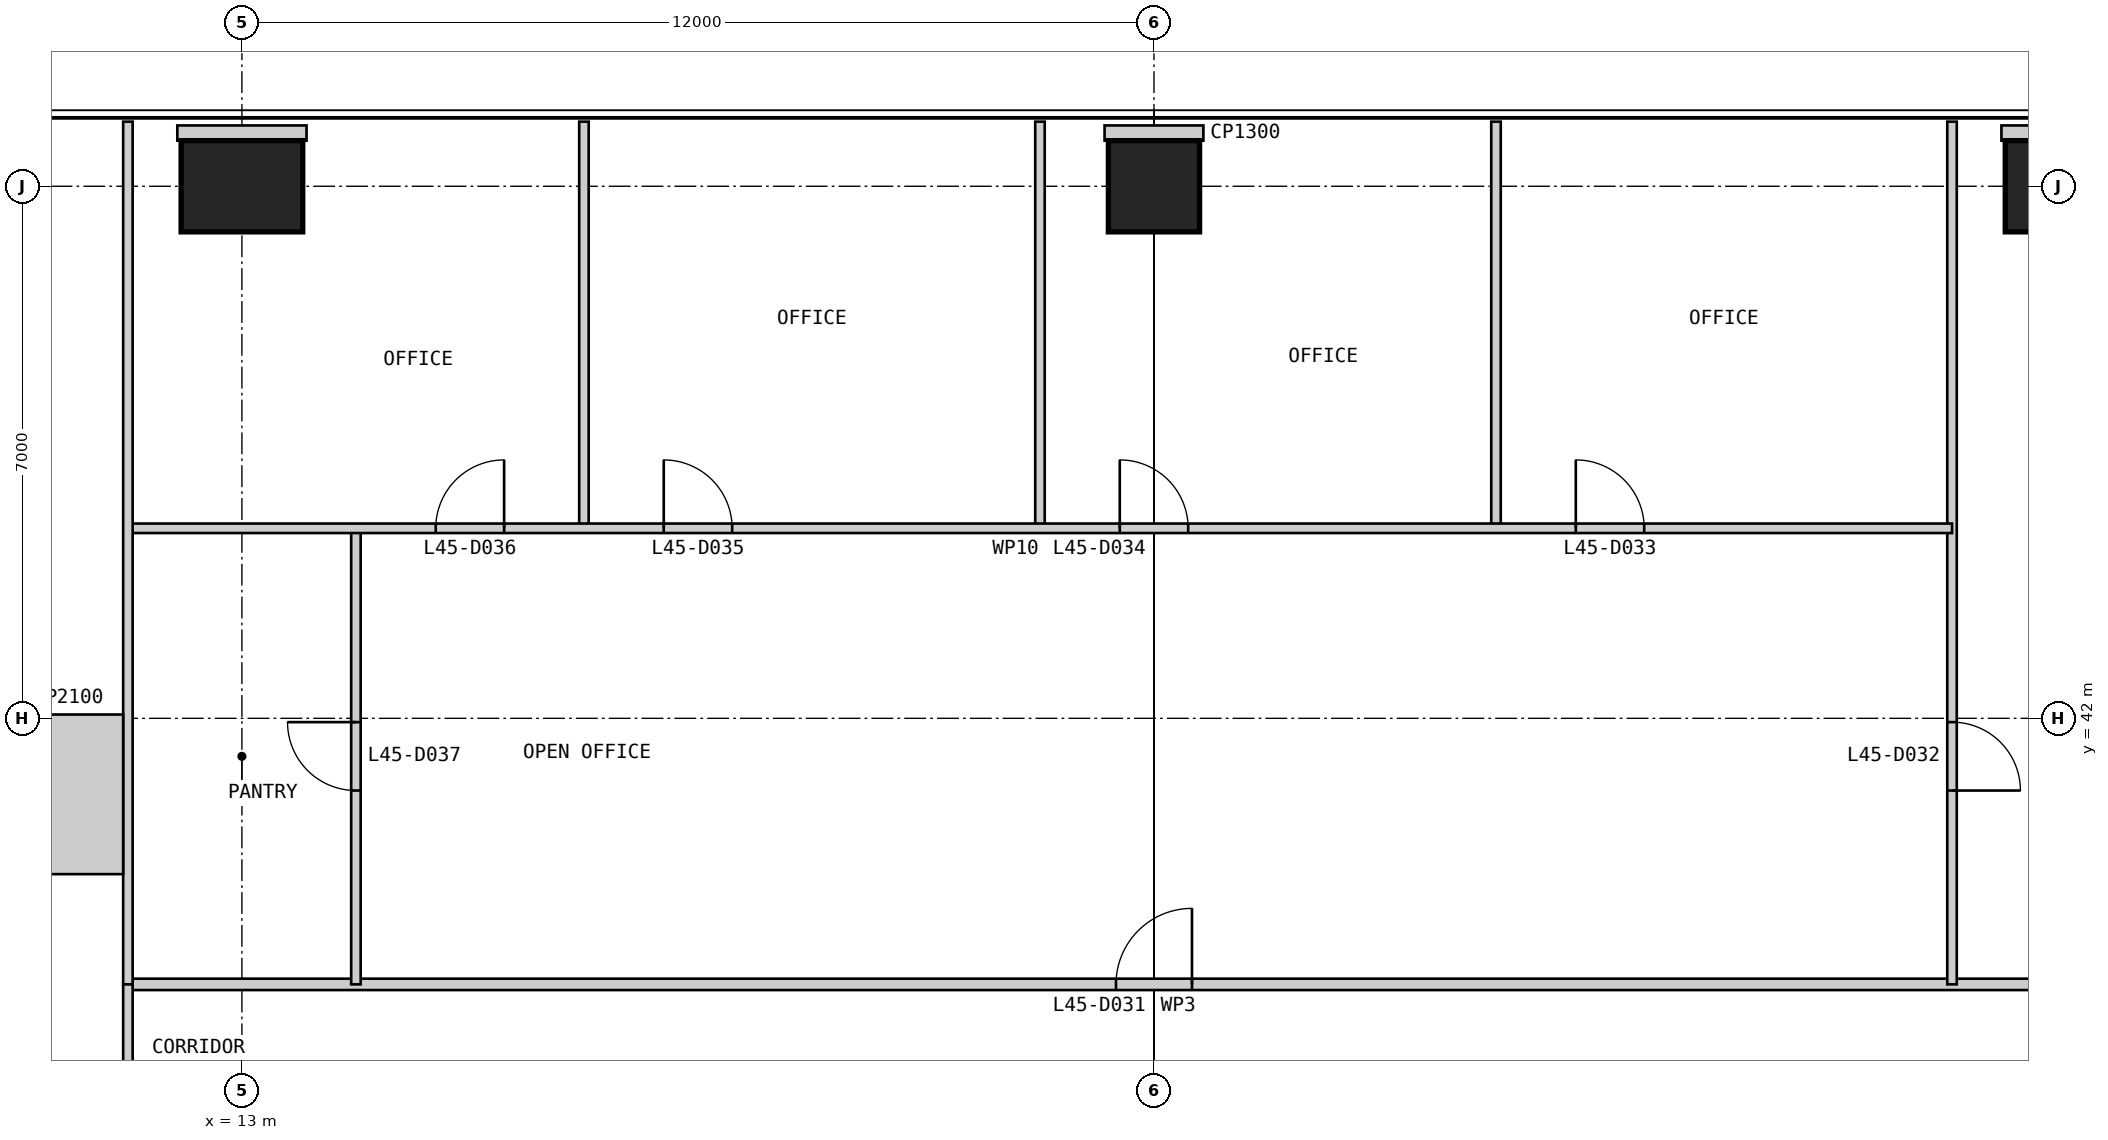
"""IFC4 building model, lengths in metres.
Left out: names, types, materials, properties, quantities, classifications, styles, units other than length and angle.
Written with IfcOpenShell. Run it as: python <this file> out.ifc"""

import sys

from ifc_helpers import new_model, si_unit, direction, frame, frame_2d, origin, origin_2d, place, context, subcontext, project, spatial, rectangle, extrude, element, fill, save


model = new_model("IFC4")
c1 = context("Model", 3, precision=1e-05, world=origin(), true_north=direction((0.0, 1.0)))
c2 = subcontext(c1, "Body", "Model", "MODEL_VIEW")
j1 = project(units=[si_unit("LENGTHUNIT", "METRE"), si_unit("PLANEANGLEUNIT", "RADIAN")], contexts=[c1])
p1 = place(None, origin())
s1 = spatial("IfcSite", under=j1, at=p1, CompositionType="ELEMENT")
p2 = place(p1, origin())
s2 = spatial("IfcBuilding", under=s1, at=p2, CompositionType="ELEMENT")
p3 = place(p2, frame((0.0, 0.0, 193.8)))
s3 = spatial("IfcBuildingStorey", under=s2, at=p3, CompositionType="ELEMENT", Elevation=193.8)
p4 = place(p3, frame((37.0, 49.0, 0.0), z_axis=(0.0, 0.0, 1.0), x_axis=(1.0, 0.0, 0.0)))
e1 = element("IfcColumn", 1, at=p4, inside=s3, PredefinedType="COLUMN", context=c2, shape_type="SweptSolid", body=[
    extrude(rectangle(XDim=1.6, YDim=1.2, at=origin_2d()), origin(), (0.0, 0.0, 1.0), 4.0),
])
p5 = place(p3, frame((25.0, 49.0, 0.0), z_axis=(0.0, 0.0, 1.0), x_axis=(1.0, 0.0, 0.0)))
e2 = element("IfcColumn", 2, at=p5, inside=s3, PredefinedType="COLUMN", context=c2, shape_type="SweptSolid", body=[
    extrude(rectangle(XDim=1.2, YDim=1.2, at=origin_2d()), origin(), (0.0, 0.0, 1.0), 4.0),
])
p6 = place(p3, frame((13.0, 49.0, 0.0), z_axis=(0.0, 0.0, 1.0), x_axis=(1.0, 0.0, 0.0)))
e3 = element("IfcColumn", 3, at=p6, inside=s3, PredefinedType="COLUMN", context=c2, shape_type="SweptSolid", body=[
    extrude(rectangle(XDim=1.6, YDim=1.2, at=origin_2d()), origin(), (0.0, 0.0, 1.0), 4.0),
])
p7 = place(p3, frame((38.5, 38.5, 0.0), z_axis=(0.0, 0.0, 1.0), x_axis=(-1.0, 0.0, 0.0)))
e4 = element("IfcWall", 4, at=p7, inside=s3, PredefinedType="PARTITIONING", context=c2, shape_type="SweptSolid", body=[
    extrude(rectangle(XDim=27.0, YDim=0.15, at=frame_2d((13.5, 0.0))), origin(), (0.0, 0.0, 1.0), 3.85),
])
p8 = place(p7, frame((13.0, 0.0, 0.0)))
e5 = element("IfcOpeningElement", 5, at=p8, cuts=e4, PredefinedType="OPENING", context=c2, shape_type="SweptSolid", body=[
    extrude(rectangle(XDim=1.0, YDim=2.2, at=frame_2d((0.5, 1.1))), frame((0.0, 0.085, 0.0), z_axis=(0.0, -1.0, 0.0), x_axis=(1.0, 0.0, 0.0)), (0.0, 0.0, 1.0), 0.17),
])
p9 = place(p3, frame((35.5, 49.85, 0.0), z_axis=(0.0, 0.0, 1.0), x_axis=(0.0, -1.0, 0.0)))
e6 = element("IfcWall", 6, at=p9, inside=s3, PredefinedType="PARTITIONING", context=c2, shape_type="SweptSolid", body=[
    extrude(rectangle(XDim=11.35, YDim=0.125, at=frame_2d((5.675, 0.0))), origin(), (0.0, 0.0, 1.0), 3.85),
])
p10 = place(p9, frame((7.9, 0.0, 0.0)))
e7 = element("IfcOpeningElement", 7, at=p10, cuts=e6, PredefinedType="OPENING", context=c2, shape_type="SweptSolid", body=[
    extrude(rectangle(XDim=0.9, YDim=2.2, at=frame_2d((0.45, 1.1))), frame((0.0, 0.073, 0.0), z_axis=(0.0, -1.0, 0.0), x_axis=(1.0, 0.0, 0.0)), (0.0, 0.0, 1.0), 0.145),
])
for number, where, z_axis, x_axis in (
    (8, (29.5, 49.85, 0.0), (0.0, 0.0, 1.0), (0.0, -1.0, 0.0)),
    (9, (23.5, 49.85, 0.0), (0.0, 0.0, 1.0), (0.0, -1.0, 0.0)),
    (10, (17.5, 49.85, 0.0), (0.0, 0.0, 1.0), (0.0, -1.0, 0.0)),
):
    element("IfcWall", number, at=place(p3, frame(where, z_axis=z_axis, x_axis=x_axis)), inside=s3, PredefinedType="PARTITIONING", context=c2, shape_type="SweptSolid", body=[
        extrude(rectangle(XDim=5.35, YDim=0.125, at=frame_2d((2.675, 0.0))), origin(), (0.0, 0.0, 1.0), 3.85),
    ])
p11 = place(p3, frame((14.5, 44.5, 0.0), z_axis=(0.0, 0.0, 1.0), x_axis=(0.0, -1.0, 0.0)))
e11 = element("IfcWall", 11, at=p11, inside=s3, PredefinedType="PARTITIONING", context=c2, shape_type="SweptSolid", body=[
    extrude(rectangle(XDim=6.0, YDim=0.125, at=frame_2d((3.0, 0.0))), origin(), (0.0, 0.0, 1.0), 3.85),
])
p12 = place(p11, frame((2.55, 0.0, 0.0)))
e12 = element("IfcOpeningElement", 12, at=p12, cuts=e11, PredefinedType="OPENING", context=c2, shape_type="SweptSolid", body=[
    extrude(rectangle(XDim=0.9, YDim=2.2, at=frame_2d((0.45, 1.1))), frame((0.0, 0.073, 0.0), z_axis=(0.0, -1.0, 0.0), x_axis=(1.0, 0.0, 0.0)), (0.0, 0.0, 1.0), 0.145),
])
p13 = place(p3, frame((35.5, 44.5, 0.0), z_axis=(0.0, 0.0, 1.0), x_axis=(-1.0, 0.0, 0.0)))
e13 = element("IfcWall", 13, at=p13, inside=s3, PredefinedType="PARTITIONING", context=c2, shape_type="SweptSolid", body=[
    extrude(rectangle(XDim=24.0, YDim=0.125, at=frame_2d((12.0, 0.0))), origin(), (0.0, 0.0, 1.0), 3.85),
])
p14 = place(p13, frame((4.05, 0.0, 0.0)))
e14 = element("IfcOpeningElement", 14, at=p14, cuts=e13, PredefinedType="OPENING", context=c2, shape_type="SweptSolid", body=[
    extrude(rectangle(XDim=0.9, YDim=2.2, at=frame_2d((0.45, 1.1))), frame((0.0, 0.073, 0.0), z_axis=(0.0, -1.0, 0.0), x_axis=(1.0, 0.0, 0.0)), (0.0, 0.0, 1.0), 0.145),
])
p15 = place(p13, frame((10.05, 0.0, 0.0)))
e15 = element("IfcOpeningElement", 15, at=p15, cuts=e13, PredefinedType="OPENING", context=c2, shape_type="SweptSolid", body=[
    extrude(rectangle(XDim=0.9, YDim=2.2, at=frame_2d((0.45, 1.1))), frame((0.0, 0.073, 0.0), z_axis=(0.0, -1.0, 0.0), x_axis=(1.0, 0.0, 0.0)), (0.0, 0.0, 1.0), 0.145),
])
p16 = place(p13, frame((16.05, 0.0, 0.0)))
e16 = element("IfcOpeningElement", 16, at=p16, cuts=e13, PredefinedType="OPENING", context=c2, shape_type="SweptSolid", body=[
    extrude(rectangle(XDim=0.9, YDim=2.2, at=frame_2d((0.45, 1.1))), frame((0.0, 0.073, 0.0), z_axis=(0.0, -1.0, 0.0), x_axis=(1.0, 0.0, 0.0)), (0.0, 0.0, 1.0), 0.145),
])
p17 = place(p13, frame((19.05, 0.0, 0.0)))
e17 = element("IfcOpeningElement", 17, at=p17, cuts=e13, PredefinedType="OPENING", context=c2, shape_type="SweptSolid", body=[
    extrude(rectangle(XDim=0.9, YDim=2.2, at=frame_2d((0.45, 1.1))), frame((0.0, 0.073, 0.0), z_axis=(0.0, -1.0, 0.0), x_axis=(1.0, 0.0, 0.0)), (0.0, 0.0, 1.0), 0.145),
])
p18 = place(p3, frame((11.5, 49.85, 0.0), z_axis=(0.0, 0.0, 1.0), x_axis=(0.0, -1.0, 0.0)))
e18 = element("IfcWall", 18, at=p18, inside=s3, PredefinedType="PARTITIONING", context=c2, shape_type="SweptSolid", body=[
    extrude(rectangle(XDim=11.35, YDim=0.125, at=frame_2d((5.675, 0.0))), origin(), (0.0, 0.0, 1.0), 3.85),
])
p19 = place(p3, frame((11.5, 38.5, 0.0), z_axis=(0.0, 0.0, 1.0), x_axis=(0.0, -1.0, 0.0)))
e19 = element("IfcWall", 19, at=p19, inside=s3, PredefinedType="PARTITIONING", context=c2, shape_type="SweptSolid", body=[
    extrude(rectangle(XDim=3.0, YDim=0.125, at=frame_2d((1.5, 0.0))), origin(), (0.0, 0.0, 1.0), 3.85),
])
p20 = place(p3, frame((37.0, 49.8, 0.0), z_axis=(0.0, 0.0, 1.0), x_axis=(0.0, -1.0, 0.0)))
e20 = element("IfcWall", 20, at=p20, inside=s3, PredefinedType="PARTITIONING", context=c2, shape_type="SweptSolid", body=[
    extrude(rectangle(XDim=0.2, YDim=1.7, at=frame_2d((0.1, 0.0))), origin(), (0.0, 0.0, 1.0), 3.85),
])
p21 = place(p3, frame((25.0, 49.8, 0.0), z_axis=(0.0, 0.0, 1.0), x_axis=(0.0, -1.0, 0.0)))
e21 = element("IfcWall", 21, at=p21, inside=s3, PredefinedType="PARTITIONING", context=c2, shape_type="SweptSolid", body=[
    extrude(rectangle(XDim=0.2, YDim=1.3, at=frame_2d((0.1, 0.0))), origin(), (0.0, 0.0, 1.0), 3.85),
])
p22 = place(p3, frame((13.0, 49.8, 0.0), z_axis=(0.0, 0.0, 1.0), x_axis=(0.0, -1.0, 0.0)))
e22 = element("IfcWall", 22, at=p22, inside=s3, PredefinedType="PARTITIONING", context=c2, shape_type="SweptSolid", body=[
    extrude(rectangle(XDim=0.2, YDim=1.7, at=frame_2d((0.1, 0.0))), origin(), (0.0, 0.0, 1.0), 3.85),
])
p23 = place(p3, frame((11.438, 41.0, 0.0), z_axis=(0.0, 0.0, 1.0), x_axis=(-1.0, 0.0, 0.0)))
e23 = element("IfcWall", 23, at=p23, inside=s3, PredefinedType="PARTITIONING", context=c2, shape_type="SweptSolid", body=[
    extrude(rectangle(XDim=1.438, YDim=2.1, at=frame_2d((0.719, 0.0))), origin(), (0.0, 0.0, 1.0), 3.85),
])
p24 = place(p8, frame((1.0, 0.0, 0.0), z_axis=(0.0, 0.0, 1.0), x_axis=(-1.0, 0.0, 0.0)))
e24 = element("IfcDoor", 24, at=p24, inside=s3, OperationType="SINGLE_SWING_RIGHT", PredefinedType="DOOR", context=c2, shape_type="SweptSolid", body=[
    extrude(rectangle(XDim=1.0, YDim=2.2, at=frame_2d((0.5, 1.1))), frame((0.0, 0.025, 0.0), z_axis=(0.0, -1.0, 0.0), x_axis=(1.0, 0.0, 0.0)), (0.0, 0.0, 1.0), 0.05),
])
fill(e5, e24)
p25 = place(p10, origin())
e25 = element("IfcDoor", 25, at=p25, inside=s3, OperationType="SINGLE_SWING_RIGHT", PredefinedType="DOOR", context=c2, shape_type="SweptSolid", body=[
    extrude(rectangle(XDim=0.9, YDim=2.2, at=frame_2d((0.45, 1.1))), frame((0.0, 0.025, 0.0), z_axis=(0.0, -1.0, 0.0), x_axis=(1.0, 0.0, 0.0)), (0.0, 0.0, 1.0), 0.05),
])
fill(e7, e25)
p26 = place(p14, frame((0.9, 0.0, 0.0), z_axis=(0.0, 0.0, 1.0), x_axis=(-1.0, 0.0, 0.0)))
e26 = element("IfcDoor", 26, at=p26, inside=s3, OperationType="SINGLE_SWING_LEFT", PredefinedType="DOOR", context=c2, shape_type="SweptSolid", body=[
    extrude(rectangle(XDim=0.9, YDim=2.2, at=frame_2d((0.45, 1.1))), frame((0.0, 0.025, 0.0), z_axis=(0.0, -1.0, 0.0), x_axis=(1.0, 0.0, 0.0)), (0.0, 0.0, 1.0), 0.05),
])
fill(e14, e26)
p27 = place(p15, frame((0.9, 0.0, 0.0), z_axis=(0.0, 0.0, 1.0), x_axis=(-1.0, 0.0, 0.0)))
e27 = element("IfcDoor", 27, at=p27, inside=s3, OperationType="SINGLE_SWING_LEFT", PredefinedType="DOOR", context=c2, shape_type="SweptSolid", body=[
    extrude(rectangle(XDim=0.9, YDim=2.2, at=frame_2d((0.45, 1.1))), frame((0.0, 0.025, 0.0), z_axis=(0.0, -1.0, 0.0), x_axis=(1.0, 0.0, 0.0)), (0.0, 0.0, 1.0), 0.05),
])
fill(e15, e27)
p28 = place(p16, frame((0.9, 0.0, 0.0), z_axis=(0.0, 0.0, 1.0), x_axis=(-1.0, 0.0, 0.0)))
e28 = element("IfcDoor", 28, at=p28, inside=s3, OperationType="SINGLE_SWING_LEFT", PredefinedType="DOOR", context=c2, shape_type="SweptSolid", body=[
    extrude(rectangle(XDim=0.9, YDim=2.2, at=frame_2d((0.45, 1.1))), frame((0.0, 0.025, 0.0), z_axis=(0.0, -1.0, 0.0), x_axis=(1.0, 0.0, 0.0)), (0.0, 0.0, 1.0), 0.05),
])
fill(e16, e28)
p29 = place(p17, frame((0.9, 0.0, 0.0), z_axis=(0.0, 0.0, 1.0), x_axis=(-1.0, 0.0, 0.0)))
e29 = element("IfcDoor", 29, at=p29, inside=s3, OperationType="SINGLE_SWING_RIGHT", PredefinedType="DOOR", context=c2, shape_type="SweptSolid", body=[
    extrude(rectangle(XDim=0.9, YDim=2.2, at=frame_2d((0.45, 1.1))), frame((0.0, 0.025, 0.0), z_axis=(0.0, -1.0, 0.0), x_axis=(1.0, 0.0, 0.0)), (0.0, 0.0, 1.0), 0.05),
])
fill(e17, e29)
p30 = place(p12, frame((0.9, 0.0, 0.0), z_axis=(0.0, 0.0, 1.0), x_axis=(-1.0, 0.0, 0.0)))
e30 = element("IfcDoor", 30, at=p30, inside=s3, OperationType="SINGLE_SWING_RIGHT", PredefinedType="DOOR", context=c2, shape_type="SweptSolid", body=[
    extrude(rectangle(XDim=0.9, YDim=2.2, at=frame_2d((0.45, 1.1))), frame((0.0, 0.025, 0.0), z_axis=(0.0, -1.0, 0.0), x_axis=(1.0, 0.0, 0.0)), (0.0, 0.0, 1.0), 0.05),
])
fill(e12, e30)
save(model, sys.argv[1])
